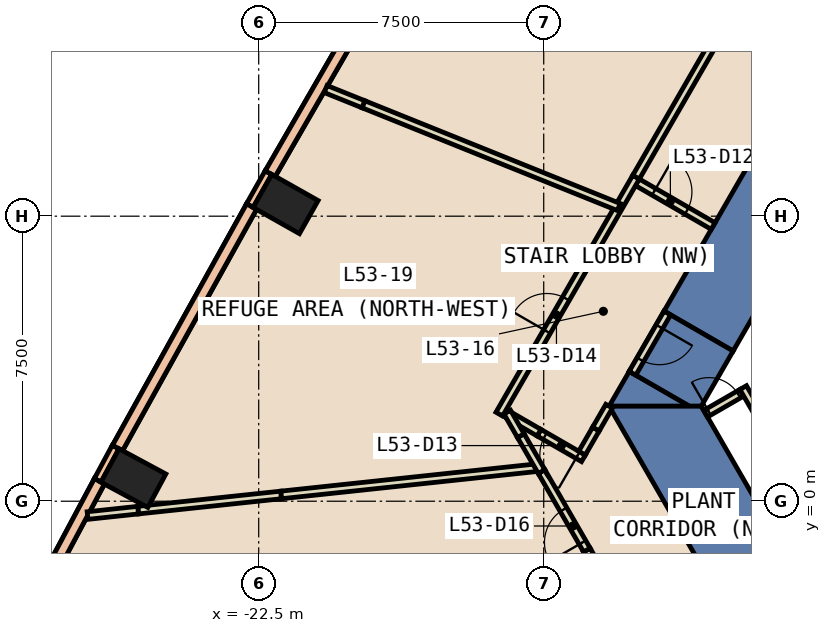
"""IFC4 building model, lengths in metres.
Left out: names, types, materials, properties, quantities, classifications, styles, units other than length and angle.
Written with IfcOpenShell. Run it as: python <this file> out.ifc"""

import sys

from ifc_helpers import new_model, si_unit, direction, frame, frame_2d, origin, origin_2d, place, context, subcontext, project, spatial, polyline, rectangle, outline, extrude, element, fill, save


model = new_model("IFC4")
c1 = context("Model", 3, precision=1e-05, world=origin(), true_north=direction((0.0, 1.0)))
c2 = subcontext(c1, "Body", "Model", "MODEL_VIEW")
j1 = project(units=[si_unit("LENGTHUNIT", "METRE"), si_unit("PLANEANGLEUNIT", "RADIAN")], contexts=[c1])
p1 = place(None, origin())
s1 = spatial("IfcSite", under=j1, at=p1, CompositionType="ELEMENT")
p2 = place(p1, origin())
s2 = spatial("IfcBuilding", under=s1, at=p2, CompositionType="ELEMENT")
p3 = place(p2, frame((0.0, 0.0, 236.0)))
s3 = spatial("IfcBuildingStorey", under=s2, at=p3, CompositionType="ELEMENT", Elevation=236.0)
for number, where, z_axis, x_axis in (
    (1, (-21.792, 7.82, -0.6), (0.0, 0.0, 1.0), (0.491, 0.871, 0.0)),
    (2, (-25.797, 0.608, -0.6), (0.0, 0.0, 1.0), (0.474, 0.88, 0.0)),
):
    element("IfcColumn", number, at=place(p3, frame(where, z_axis=z_axis, x_axis=x_axis)), inside=s3, PredefinedType="COLUMN", context=c2, shape_type="SweptSolid", body=[
        extrude(rectangle(XDim=1.0, YDim=1.4, at=origin_2d()), origin(), (0.0, 0.0, 1.0), 5.4),
    ])
p4 = place(p3, frame((0.0, 0.0, -0.6)))
e3 = element("IfcWall", 3, at=p4, inside=s3, PredefinedType="SHEAR", context=c2, shape_type="SweptSolid", body=[
    extrude(outline(polyline([(-11.834, 5.002), (-10.016, 3.952), (-5.427, 11.9), (-6.64, 14.0), (-11.834, 5.002)])), origin(), (0.0, 0.0, 1.0), 5.4),
])
p5 = place(p3, frame((0.0, 0.0, -0.6)))
e4 = element("IfcWall", 4, at=p5, inside=s3, PredefinedType="SHEAR", context=c2, shape_type="SweptSolid", body=[
    extrude(outline(polyline([(-11.16, 2.5), (-12.749, 3.417), (-13.279, 2.5), (-11.16, 2.5)])), origin(), (0.0, 0.0, 1.0), 5.4),
])
p6 = place(p3, frame((0.0, 0.0, 3.6)))
e5 = element("IfcWall", 5, at=p6, inside=s3, PredefinedType="SHEAR", context=c2, shape_type="SweptSolid", body=[
    extrude(outline(polyline([(-12.749, 3.417), (-11.16, 2.5), (-10.854, 2.5), (-10.016, 3.952), (-11.834, 5.002), (-12.749, 3.417)])), origin(), (0.0, 0.0, 1.0), 1.2),
])
p7 = place(p3, frame((0.0, 0.0, -0.6)))
e6 = element("IfcWall", 6, at=p7, inside=s3, PredefinedType="SHEAR", context=c2, shape_type="SweptSolid", body=[
    extrude(outline(polyline([(-13.279, 2.5), (-6.64, -9.0), (-5.427, -6.9), (-10.854, 2.5), (-13.279, 2.5)])), origin(), (0.0, 0.0, 1.0), 5.4),
])
for number, where, z_axis, x_axis in (
    (7, (-22.243, 8.648, 0.0), (0.0, 0.0, 1.0), (-0.492, -0.871, 0.0)),
    (8, (-26.264, 1.428, 0.0), (0.0, 0.0, 1.0), (-0.474, -0.881, 0.0)),
):
    element("IfcWall", number, at=place(p3, frame(where, z_axis=z_axis, x_axis=x_axis)), inside=s3, PredefinedType="STANDARD", context=c2, shape_type="SweptSolid", body=[
        extrude(rectangle(XDim=1.0, YDim=0.2, at=frame_2d((0.5, 0.0))), origin(), (0.0, 0.0, 1.0), 4.8),
    ])
p8 = place(p3, frame((-18.563, 14.913, 0.0), z_axis=(0.0, 0.0, 1.0), x_axis=(-0.499980331134, -0.866036759312, 0.0)))
e9 = element("IfcWall", 9, at=p8, inside=s3, PredefinedType="STANDARD", context=c2, shape_type="SweptSolid", body=[
    extrude(rectangle(XDim=7.266, YDim=0.3, at=frame_2d((3.633, 0.0))), origin(), (0.0, 0.0, 1.0), 1.2),
])
p9 = place(p3, frame((-18.563, 14.913, 4.0), z_axis=(0.0, 0.0, 1.0), x_axis=(-0.499980331134, -0.866036759312, 0.0)))
e10 = element("IfcWall", 10, at=p9, inside=s3, PredefinedType="STANDARD", context=c2, shape_type="SweptSolid", body=[
    extrude(rectangle(XDim=7.266, YDim=0.3, at=frame_2d((3.633, 0.0))), origin(), (0.0, 0.0, 1.0), 0.8),
])
p10 = place(p3, frame((-22.688, 7.752, 0.0), z_axis=(0.0, 0.0, 1.0), x_axis=(-0.485451767121, -0.874263451025, 0.0)))
e11 = element("IfcWall", 11, at=p10, inside=s3, PredefinedType="STANDARD", context=c2, shape_type="SweptSolid", body=[
    extrude(rectangle(XDim=7.266, YDim=0.3, at=frame_2d((3.633, 0.0))), origin(), (0.0, 0.0, 1.0), 1.2),
])
p11 = place(p3, frame((-22.688, 7.752, 4.0), z_axis=(0.0, 0.0, 1.0), x_axis=(-0.485451767121, -0.874263451025, 0.0)))
e12 = element("IfcWall", 12, at=p11, inside=s3, PredefinedType="STANDARD", context=c2, shape_type="SweptSolid", body=[
    extrude(rectangle(XDim=7.266, YDim=0.3, at=frame_2d((3.633, 0.0))), origin(), (0.0, 0.0, 1.0), 0.8),
])
p12 = place(p3, frame((-26.692, 0.524, 0.0), z_axis=(0.0, 0.0, 1.0), x_axis=(-0.470523779067, -0.882387314807, 0.0)))
e13 = element("IfcWall", 13, at=p12, inside=s3, PredefinedType="STANDARD", context=c2, shape_type="SweptSolid", body=[
    extrude(rectangle(XDim=7.471, YDim=0.3, at=frame_2d((3.735, 0.0))), origin(), (0.0, 0.0, 1.0), 1.2),
])
p13 = place(p3, frame((-26.692, 0.524, 4.0), z_axis=(0.0, 0.0, 1.0), x_axis=(-0.470523779067, -0.882387314807, 0.0)))
e14 = element("IfcWall", 14, at=p13, inside=s3, PredefinedType="STANDARD", context=c2, shape_type="SweptSolid", body=[
    extrude(rectangle(XDim=7.471, YDim=0.3, at=frame_2d((3.735, 0.0))), origin(), (0.0, 0.0, 1.0), 0.8),
])
p14 = place(p3, frame((-10.741, 2.303, 0.0), z_axis=(0.0, 0.0, 1.0), x_axis=(0.866063652425, 0.499933745558, 0.0)))
e15 = element("IfcWall", 15, at=p14, inside=s3, PredefinedType="PARTITIONING", context=c2, shape_type="SweptSolid", body=[
    extrude(rectangle(XDim=1.1, YDim=0.2, at=frame_2d((0.55, 0.0))), origin(), (0.0, 0.0, 1.0), 4.8),
])
p15 = place(p14, frame((0.1, 0.0, 0.0)))
e16 = element("IfcOpeningElement", 16, at=p15, cuts=e15, PredefinedType="OPENING", context=c2, shape_type="SweptSolid", body=[
    extrude(rectangle(XDim=0.9, YDim=2.1, at=frame_2d((0.45, 1.05))), frame((0.0, 0.11, 0.0), z_axis=(0.0, -1.0, 0.0), x_axis=(1.0, 0.0, 0.0)), (0.0, 0.0, 1.0), 0.22),
])
p16 = place(p3, frame((-9.751, 2.99, 0.0), z_axis=(0.0, 0.0, 1.0), x_axis=(0.499955951776, -0.866050833545, 0.0)))
e17 = element("IfcWall", 17, at=p16, inside=s3, PredefinedType="PARTITIONING", context=c2, shape_type="SweptSolid", body=[
    extrude(rectangle(XDim=5.4, YDim=0.2, at=frame_2d((2.7, 0.0))), origin(), (0.0, 0.0, 1.0), 4.8),
])
p17 = place(p3, frame((-12.62, 8.441, 0.0), z_axis=(0.0, 0.0, 1.0), x_axis=(0.865999212041, -0.500045362686, 0.0)))
e18 = element("IfcWall", 18, at=p17, inside=s3, PredefinedType="PARTITIONING", context=c2, shape_type="SweptSolid", body=[
    extrude(rectangle(XDim=2.4, YDim=0.2, at=frame_2d((1.2, 0.0))), origin(), (0.0, 0.0, 1.0), 4.8),
])
p18 = place(p17, frame((0.6, 0.0, 0.0)))
e19 = element("IfcOpeningElement", 19, at=p18, cuts=e18, PredefinedType="OPENING", context=c2, shape_type="SweptSolid", body=[
    extrude(rectangle(XDim=1.0, YDim=2.1, at=frame_2d((0.5, 1.05))), frame((0.0, 0.11, 0.0), z_axis=(0.0, -1.0, 0.0), x_axis=(1.0, 0.0, 0.0)), (0.0, 0.0, 1.0), 0.22),
])
p19 = place(p3, frame((-13.955, 1.129, 0.0), z_axis=(0.0, 0.0, 1.0), x_axis=(-0.86610721073, 0.499858279437, 0.0)))
e20 = element("IfcWall", 20, at=p19, inside=s3, PredefinedType="PARTITIONING", context=c2, shape_type="SweptSolid", body=[
    extrude(rectangle(XDim=1.349, YDim=0.2, at=frame_2d((0.674, 0.0))), origin(), (0.0, 0.0, 1.0), 2.4),
])
p20 = place(p19, frame((0.17, 0.0, 0.0)))
e21 = element("IfcOpeningElement", 21, at=p20, cuts=e20, PredefinedType="OPENING", context=c2, shape_type="SweptSolid", body=[
    extrude(rectangle(XDim=1.0, YDim=2.1, at=frame_2d((0.5, 1.05))), frame((0.0, 0.11, 0.0), z_axis=(0.0, -1.0, 0.0), x_axis=(1.0, 0.0, 0.0)), (0.0, 0.0, 1.0), 0.22),
])
p21 = place(p3, frame((-13.992, 1.266, 0.0), z_axis=(0.0, 0.0, 1.0), x_axis=(0.500049712553, 0.865996700326, 0.0)))
e22 = element("IfcWall", 22, at=p21, inside=s3, PredefinedType="PARTITIONING", context=c2, shape_type="SweptSolid", body=[
    extrude(rectangle(XDim=0.732, YDim=0.2, at=frame_2d((0.366, 0.0))), origin(), (0.0, 0.0, 1.0), 2.4),
])
p22 = place(p3, frame((-16.17, 2.292, 0.0), z_axis=(0.0, 0.0, 1.0), x_axis=(0.499942581134, 0.866058552045, 0.0)))
e23 = element("IfcWall", 23, at=p22, inside=s3, PredefinedType="PARTITIONING", context=c2, shape_type="SweptSolid", body=[
    extrude(rectangle(XDim=7.2, YDim=0.2, at=frame_2d((3.6, 0.0))), origin(), (0.0, 0.0, 1.0), 4.8),
])
p23 = place(p22, frame((2.51, 0.0, 0.0)))
e24 = element("IfcOpeningElement", 24, at=p23, cuts=e23, PredefinedType="OPENING", context=c2, shape_type="SweptSolid", body=[
    extrude(rectangle(XDim=1.0, YDim=2.1, at=frame_2d((0.5, 1.05))), frame((0.0, 0.11, 0.0), z_axis=(0.0, -1.0, 0.0), x_axis=(1.0, 0.0, 0.0)), (0.0, 0.0, 1.0), 0.22),
])
p24 = place(p3, frame((-12.57, 8.528, 0.0), z_axis=(0.0, 0.0, 1.0), x_axis=(0.499907967521, 0.866078532241, 0.0)))
e25 = element("IfcWall", 25, at=p24, inside=s3, PredefinedType="PARTITIONING", context=c2, shape_type="SweptSolid", body=[
    extrude(rectangle(XDim=9.19, YDim=0.2, at=frame_2d((4.595, 0.0))), origin(), (0.0, 0.0, 1.0), 4.8),
])
p25 = place(p24, frame((7.535, 0.0, 0.0)))
e26 = element("IfcOpeningElement", 26, at=p25, cuts=e25, PredefinedType="OPENING", context=c2, shape_type="SweptSolid", body=[
    extrude(rectangle(XDim=1.0, YDim=2.1, at=frame_2d((0.5, 1.05))), frame((0.0, 0.11, 0.0), z_axis=(0.0, -1.0, 0.0), x_axis=(1.0, 0.0, 0.0)), (0.0, 0.0, 1.0), 0.22),
])
p26 = place(p3, frame((-13.46, -1.987, 0.0), z_axis=(0.0, 0.0, 1.0), x_axis=(-0.499670304667, 0.866215669815, 0.0)))
e27 = element("IfcWall", 27, at=p26, inside=s3, PredefinedType="PARTITIONING", context=c2, shape_type="SweptSolid", body=[
    extrude(rectangle(XDim=0.811, YDim=0.2, at=frame_2d((0.405, 0.0))), origin(), (0.0, 0.0, 1.0), 2.4),
])
p27 = place(p3, frame((-20.738, 10.845, 0.0), z_axis=(0.0, 0.0, 1.0), x_axis=(0.927817184834, -0.373035214862, 0.0)))
e28 = element("IfcWall", 28, at=p27, inside=s3, PredefinedType="PARTITIONING", context=c2, shape_type="SweptSolid", body=[
    extrude(rectangle(XDim=1.075, YDim=0.2, at=frame_2d((0.537, 0.0))), origin(), (0.0, 0.0, 1.0), 2.4),
])
p28 = place(p3, frame((-15.12, 0.889, 0.0), z_axis=(0.0, 0.0, 1.0), x_axis=(-0.994370100713, -0.105962742547, 0.0)))
e29 = element("IfcWall", 29, at=p28, inside=s3, PredefinedType="PARTITIONING", context=c2, shape_type="SweptSolid", body=[
    extrude(rectangle(XDim=6.832, YDim=0.2, at=frame_2d((3.416, 0.0))), origin(), (0.0, 0.0, 1.0), 2.4),
])
p29 = place(p3, frame((-11.748, 4.952, 0.0), z_axis=(0.0, 0.0, 1.0), x_axis=(-0.500215337403, -0.865901042976, 0.0)))
e30 = element("IfcWall", 30, at=p29, inside=s3, PredefinedType="PARTITIONING", context=c2, shape_type="SweptSolid", body=[
    extrude(rectangle(XDim=1.829, YDim=0.2, at=frame_2d((0.915, 0.0))), origin(), (0.0, 0.0, 1.0), 2.4),
])
p30 = place(p29, frame((0.415, 0.0, 0.0)))
e31 = element("IfcOpeningElement", 31, at=p30, cuts=e30, PredefinedType="OPENING", context=c2, shape_type="SweptSolid", body=[
    extrude(rectangle(XDim=1.0, YDim=2.1, at=frame_2d((0.5, 1.05))), frame((0.0, 0.11, 0.0), z_axis=(0.0, -1.0, 0.0), x_axis=(1.0, 0.0, 0.0)), (0.0, 0.0, 1.0), 0.22),
])
p31 = place(p3, frame((-15.123, 1.803, 0.0), z_axis=(0.0, 0.0, 1.0), x_axis=(-0.865652990476, 0.500644484719, 0.0)))
e32 = element("IfcWall", 32, at=p31, inside=s3, PredefinedType="PARTITIONING", context=c2, shape_type="SweptSolid", body=[
    extrude(rectangle(XDim=0.909, YDim=0.2, at=frame_2d((0.455, 0.0))), origin(), (0.0, 0.0, 1.0), 4.8),
])
p32 = place(p3, frame((-13.626, 1.9, 0.0), z_axis=(0.0, 0.0, 1.0), x_axis=(0.500494699761, 0.86573960029, 0.0)))
e33 = element("IfcWall", 33, at=p32, inside=s3, PredefinedType="PARTITIONING", context=c2, shape_type="SweptSolid", body=[
    extrude(rectangle(XDim=0.693, YDim=0.2, at=frame_2d((0.347, 0.0))), origin(), (0.0, 0.0, 1.0), 4.8),
])
p33 = place(p3, frame((-13.865, -1.285, 0.0), z_axis=(0.0, 0.0, 1.0), x_axis=(-0.499905644439, 0.86607987314, 0.0)))
e34 = element("IfcWall", 34, at=p33, inside=s3, PredefinedType="PARTITIONING", context=c2, shape_type="SweptSolid", body=[
    extrude(rectangle(XDim=2.384, YDim=0.2, at=frame_2d((1.192, 0.0))), origin(), (0.0, 0.0, 1.0), 4.8),
])
p34 = place(p33, frame((0.231, 0.0, 0.0)))
e35 = element("IfcOpeningElement", 35, at=p34, cuts=e34, PredefinedType="OPENING", context=c2, shape_type="SweptSolid", body=[
    extrude(rectangle(XDim=1.0, YDim=2.1, at=frame_2d((0.5, 1.05))), frame((0.0, 0.11, 0.0), z_axis=(0.0, -1.0, 0.0), x_axis=(1.0, 0.0, 0.0)), (0.0, 0.0, 1.0), 0.22),
])
p35 = place(p3, frame((-15.057, 0.78, 0.0), z_axis=(0.0, 0.0, 1.0), x_axis=(-0.500348398615, 0.865824162289, 0.0)))
e36 = element("IfcWall", 36, at=p35, inside=s3, PredefinedType="PARTITIONING", context=c2, shape_type="SweptSolid", body=[
    extrude(rectangle(XDim=1.092, YDim=0.2, at=frame_2d((0.546, 0.0))), origin(), (0.0, 0.0, 1.0), 2.4),
])
p36 = place(p3, frame((-15.603, 1.725, 0.0), z_axis=(0.0, 0.0, 1.0), x_axis=(-0.499594255707, 0.866259533664, 0.0)))
e37 = element("IfcWall", 37, at=p36, inside=s3, PredefinedType="PARTITIONING", context=c2, shape_type="SweptSolid", body=[
    extrude(rectangle(XDim=0.714, YDim=0.2, at=frame_2d((0.357, 0.0))), origin(), (0.0, 0.0, 1.0), 4.8),
])
p37 = place(p3, frame((-19.741, 10.444, 0.0), z_axis=(0.0, 0.0, 1.0), x_axis=(0.927679169768, -0.373378304107, 0.0)))
e38 = element("IfcWall", 38, at=p37, inside=s3, PredefinedType="PARTITIONING", context=c2, shape_type="SweptSolid", body=[
    extrude(rectangle(XDim=7.24, YDim=0.2, at=frame_2d((3.62, 0.0))), origin(), (0.0, 0.0, 1.0), 4.8),
])
p38 = place(p3, frame((-21.913, 0.165, 0.0), z_axis=(0.0, 0.0, 1.0), x_axis=(-0.994387757351, -0.105796918812, 0.0)))
e39 = element("IfcWall", 39, at=p38, inside=s3, PredefinedType="PARTITIONING", context=c2, shape_type="SweptSolid", body=[
    extrude(rectangle(XDim=3.782, YDim=0.2, at=frame_2d((1.891, 0.0))), origin(), (0.0, 0.0, 1.0), 4.8),
])
p39 = place(p3, frame((-25.674, -0.235, 0.0), z_axis=(0.0, 0.0, 1.0), x_axis=(-0.994351234006, -0.106139641183, 0.0)))
e40 = element("IfcWall", 40, at=p39, inside=s3, PredefinedType="PARTITIONING", context=c2, shape_type="SweptSolid", body=[
    extrude(rectangle(XDim=1.336, YDim=0.2, at=frame_2d((0.668, 0.0))), origin(), (0.0, 0.0, 1.0), 2.4),
])
p40 = place(p18, origin())
e41 = element("IfcDoor", 41, at=p40, inside=s3, OperationType="SINGLE_SWING_RIGHT", PredefinedType="DOOR", context=c2, shape_type="SweptSolid", body=[
    extrude(rectangle(XDim=1.0, YDim=2.1, at=frame_2d((0.5, 1.05))), frame((0.0, 0.025, 0.0), z_axis=(0.0, -1.0, 0.0), x_axis=(1.0, 0.0, 0.0)), (0.0, 0.0, 1.0), 0.05),
])
fill(e19, e41)
p41 = place(p20, origin())
e42 = element("IfcDoor", 42, at=p41, inside=s3, OperationType="SINGLE_SWING_LEFT", PredefinedType="DOOR", context=c2, shape_type="SweptSolid", body=[
    extrude(rectangle(XDim=1.0, YDim=2.1, at=frame_2d((0.5, 1.05))), frame((0.0, 0.025, 0.0), z_axis=(0.0, -1.0, 0.0), x_axis=(1.0, 0.0, 0.0)), (0.0, 0.0, 1.0), 0.05),
])
fill(e21, e42)
p42 = place(p23, origin())
e43 = element("IfcDoor", 43, at=p42, inside=s3, OperationType="SINGLE_SWING_RIGHT", PredefinedType="DOOR", context=c2, shape_type="SweptSolid", body=[
    extrude(rectangle(XDim=1.0, YDim=2.1, at=frame_2d((0.5, 1.05))), frame((0.0, 0.025, 0.0), z_axis=(0.0, -1.0, 0.0), x_axis=(1.0, 0.0, 0.0)), (0.0, 0.0, 1.0), 0.05),
])
fill(e24, e43)
p43 = place(p34, origin())
e44 = element("IfcDoor", 44, at=p43, inside=s3, OperationType="SINGLE_SWING_RIGHT", PredefinedType="DOOR", context=c2, shape_type="SweptSolid", body=[
    extrude(rectangle(XDim=1.0, YDim=2.1, at=frame_2d((0.5, 1.05))), frame((0.0, 0.025, 0.0), z_axis=(0.0, -1.0, 0.0), x_axis=(1.0, 0.0, 0.0)), (0.0, 0.0, 1.0), 0.05),
])
fill(e35, e44)
p44 = place(p15, origin())
e45 = element("IfcDoor", 45, at=p44, inside=s3, OperationType="SINGLE_SWING_RIGHT", PredefinedType="DOOR", context=c2, shape_type="SweptSolid", body=[
    extrude(rectangle(XDim=0.9, YDim=2.1, at=frame_2d((0.45, 1.05))), frame((0.0, 0.025, 0.0), z_axis=(0.0, -1.0, 0.0), x_axis=(1.0, 0.0, 0.0)), (0.0, 0.0, 1.0), 0.05),
])
fill(e16, e45)
p45 = place(p30, origin())
e46 = element("IfcDoor", 46, at=p45, inside=s3, OperationType="SINGLE_SWING_LEFT", PredefinedType="DOOR", context=c2, shape_type="SweptSolid", body=[
    extrude(rectangle(XDim=1.0, YDim=2.1, at=frame_2d((0.5, 1.05))), frame((0.0, 0.025, 0.0), z_axis=(0.0, -1.0, 0.0), x_axis=(1.0, 0.0, 0.0)), (0.0, 0.0, 1.0), 0.05),
])
fill(e31, e46)
save(model, sys.argv[1])
